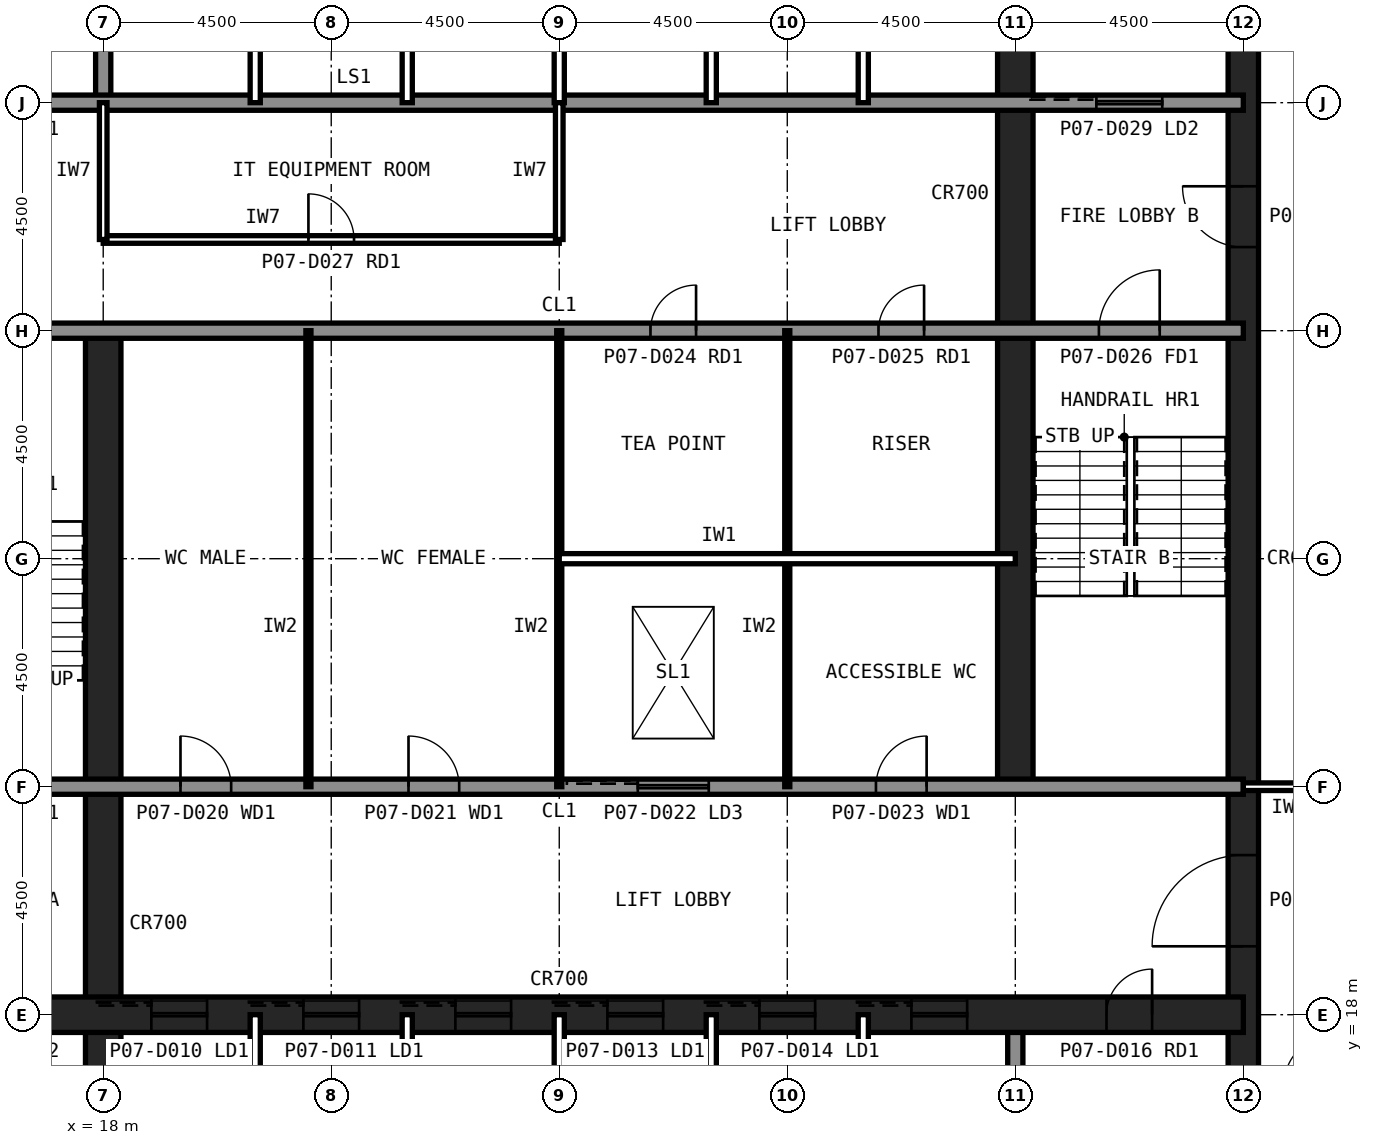
"""IFC4 building model, lengths in metres.
Left out: names, types, materials, properties, quantities, classifications, styles, units other than length and angle.
Written with IfcOpenShell. Run it as: python <this file> out.ifc"""

import sys

from ifc_helpers import new_model, si_unit, direction, frame, frame_2d, origin, place, context, subcontext, project, spatial, rectangle, extrude, element, fill, save


model = new_model("IFC4")
c1 = context("Model", 3, precision=1e-05, world=origin(), true_north=direction((0.0, 1.0)))
c2 = subcontext(c1, "Body", "Model", "MODEL_VIEW")
j1 = project(units=[si_unit("LENGTHUNIT", "METRE"), si_unit("PLANEANGLEUNIT", "RADIAN")], contexts=[c1])
p1 = place(None, origin())
s1 = spatial("IfcSite", under=j1, at=p1, CompositionType="ELEMENT")
p2 = place(p1, origin())
s2 = spatial("IfcBuilding", under=s1, at=p2, CompositionType="ELEMENT")
p3 = place(p2, frame((0.0, 0.0, 33.2)))
s3 = spatial("IfcBuildingStorey", under=s2, at=p3, CompositionType="ELEMENT", Elevation=33.2)
p4 = place(p3, frame((40.5, 13.5, 0.0), z_axis=(0.0, 0.0, 1.0), x_axis=(0.0, 1.0, 0.0)))
e1 = element("IfcWall", 1, at=p4, inside=s3, PredefinedType="SHEAR", context=c2, shape_type="SweptSolid", body=[
    extrude(rectangle(XDim=27.0, YDim=0.6, at=frame_2d((13.5, 0.0))), origin(), (0.0, 0.0, 1.0), 4.2),
])
p5 = place(p4, frame((5.85, 0.0, 0.0)))
e2 = element("IfcOpeningElement", 2, at=p5, cuts=e1, PredefinedType="OPENING", context=c2, shape_type="SweptSolid", body=[
    extrude(rectangle(XDim=1.8, YDim=2.1, at=frame_2d((0.9, 1.05))), frame((0.0, 0.31, 0.0), z_axis=(0.0, -1.0, 0.0), x_axis=(1.0, 0.0, 0.0)), (0.0, 0.0, 1.0), 0.62),
])
p6 = place(p4, frame((19.65, 0.0, 0.0)))
e3 = element("IfcOpeningElement", 3, at=p6, cuts=e1, PredefinedType="OPENING", context=c2, shape_type="SweptSolid", body=[
    extrude(rectangle(XDim=1.2, YDim=2.1, at=frame_2d((0.6, 1.05))), frame((0.0, 0.31, 0.0), z_axis=(0.0, -1.0, 0.0), x_axis=(1.0, 0.0, 0.0)), (0.0, 0.0, 1.0), 0.62),
])
p7 = place(p3, frame((18.0, 13.5, 0.0), z_axis=(0.0, 0.0, 1.0), x_axis=(0.0, 1.0, 0.0)))
e4 = element("IfcWall", 4, at=p7, inside=s3, PredefinedType="SHEAR", context=c2, shape_type="SweptSolid", body=[
    extrude(rectangle(XDim=18.0, YDim=0.7, at=frame_2d((9.0, 0.0))), origin(), (0.0, 0.0, 1.0), 4.2),
])
for number, where, z_axis, x_axis in (
    (5, (18.0, 36.0, 0.0), (0.0, 0.0, 1.0), (0.0, 1.0, 0.0)),
    (6, (36.0, 13.5, 0.0), (0.0, 0.0, 1.0), (0.0, 1.0, 0.0)),
):
    element("IfcWall", number, at=place(p3, frame(where, z_axis=z_axis, x_axis=x_axis)), inside=s3, PredefinedType="SOLIDWALL", context=c2, shape_type="SweptSolid", body=[
        extrude(rectangle(XDim=4.5, YDim=0.3, at=frame_2d((2.25, 0.0))), origin(), (0.0, 0.0, 1.0), 4.04),
    ])
p8 = place(p3, frame((36.0, 22.5, 0.0), z_axis=(0.0, 0.0, 1.0), x_axis=(0.0, 1.0, 0.0)))
e7 = element("IfcWall", 7, at=p8, inside=s3, PredefinedType="SHEAR", context=c2, shape_type="SweptSolid", body=[
    extrude(rectangle(XDim=18.0, YDim=0.7, at=frame_2d((9.0, 0.0))), origin(), (0.0, 0.0, 1.0), 4.2),
])
p9 = place(p3, frame((13.5, 18.0, 0.0), z_axis=(0.0, 0.0, 1.0), x_axis=(1.0, 0.0, 0.0)))
e8 = element("IfcWall", 8, at=p9, inside=s3, PredefinedType="SHEAR", context=c2, shape_type="SweptSolid", body=[
    extrude(rectangle(XDim=27.0, YDim=0.7, at=frame_2d((13.5, 0.0))), origin(), (0.0, 0.0, 1.0), 4.2),
])
p10 = place(p9, frame((24.3, 0.0, 0.0)))
e9 = element("IfcOpeningElement", 9, at=p10, cuts=e8, PredefinedType="OPENING", context=c2, shape_type="SweptSolid", body=[
    extrude(rectangle(XDim=0.9, YDim=2.1, at=frame_2d((0.45, 1.05))), frame((0.0, 0.36, 0.0), z_axis=(0.0, -1.0, 0.0), x_axis=(1.0, 0.0, 0.0)), (0.0, 0.0, 1.0), 0.72),
])
p11 = place(p9, frame((5.45, 0.0, 0.0)))
e10 = element("IfcOpeningElement", 10, at=p11, cuts=e8, PredefinedType="OPENING", context=c2, shape_type="SweptSolid", body=[
    extrude(rectangle(XDim=1.1, YDim=2.1, at=frame_2d((0.55, 1.05))), frame((0.0, 0.36, 0.0), z_axis=(0.0, -1.0, 0.0), x_axis=(1.0, 0.0, 0.0)), (0.0, 0.0, 1.0), 0.72),
])
p12 = place(p9, frame((8.45, 0.0, 0.0)))
e11 = element("IfcOpeningElement", 11, at=p12, cuts=e8, PredefinedType="OPENING", context=c2, shape_type="SweptSolid", body=[
    extrude(rectangle(XDim=1.1, YDim=2.1, at=frame_2d((0.55, 1.05))), frame((0.0, 0.36, 0.0), z_axis=(0.0, -1.0, 0.0), x_axis=(1.0, 0.0, 0.0)), (0.0, 0.0, 1.0), 0.72),
])
p13 = place(p9, frame((11.45, 0.0, 0.0)))
e12 = element("IfcOpeningElement", 12, at=p13, cuts=e8, PredefinedType="OPENING", context=c2, shape_type="SweptSolid", body=[
    extrude(rectangle(XDim=1.1, YDim=2.1, at=frame_2d((0.55, 1.05))), frame((0.0, 0.36, 0.0), z_axis=(0.0, -1.0, 0.0), x_axis=(1.0, 0.0, 0.0)), (0.0, 0.0, 1.0), 0.72),
])
p14 = place(p9, frame((14.45, 0.0, 0.0)))
e13 = element("IfcOpeningElement", 13, at=p14, cuts=e8, PredefinedType="OPENING", context=c2, shape_type="SweptSolid", body=[
    extrude(rectangle(XDim=1.1, YDim=2.1, at=frame_2d((0.55, 1.05))), frame((0.0, 0.36, 0.0), z_axis=(0.0, -1.0, 0.0), x_axis=(1.0, 0.0, 0.0)), (0.0, 0.0, 1.0), 0.72),
])
p15 = place(p9, frame((17.45, 0.0, 0.0)))
e14 = element("IfcOpeningElement", 14, at=p15, cuts=e8, PredefinedType="OPENING", context=c2, shape_type="SweptSolid", body=[
    extrude(rectangle(XDim=1.1, YDim=2.1, at=frame_2d((0.55, 1.05))), frame((0.0, 0.36, 0.0), z_axis=(0.0, -1.0, 0.0), x_axis=(1.0, 0.0, 0.0)), (0.0, 0.0, 1.0), 0.72),
])
p16 = place(p9, frame((20.45, 0.0, 0.0)))
e15 = element("IfcOpeningElement", 15, at=p16, cuts=e8, PredefinedType="OPENING", context=c2, shape_type="SweptSolid", body=[
    extrude(rectangle(XDim=1.1, YDim=2.1, at=frame_2d((0.55, 1.05))), frame((0.0, 0.36, 0.0), z_axis=(0.0, -1.0, 0.0), x_axis=(1.0, 0.0, 0.0)), (0.0, 0.0, 1.0), 0.72),
])
p17 = place(p9, frame((1.6, 0.0, 0.0)))
e16 = element("IfcOpeningElement", 16, at=p17, cuts=e8, PredefinedType="OPENING", context=c2, shape_type="SweptSolid", body=[
    extrude(rectangle(XDim=1.3, YDim=2.2, at=frame_2d((0.65, 1.1))), frame((0.0, 0.36, 0.0), z_axis=(0.0, -1.0, 0.0), x_axis=(1.0, 0.0, 0.0)), (0.0, 0.0, 1.0), 0.72),
])
p18 = place(p3, frame((13.5, 36.0, 0.0), z_axis=(0.0, 0.0, 1.0), x_axis=(1.0, 0.0, 0.0)))
e17 = element("IfcWall", 17, at=p18, inside=s3, PredefinedType="SOLIDWALL", context=c2, shape_type="SweptSolid", body=[
    extrude(rectangle(XDim=27.0, YDim=0.3, at=frame_2d((13.5, 0.0))), origin(), (0.0, 0.0, 1.0), 4.04),
])
p19 = place(p18, frame((1.8, 0.0, 0.0)))
e18 = element("IfcOpeningElement", 18, at=p19, cuts=e17, PredefinedType="OPENING", context=c2, shape_type="SweptSolid", body=[
    extrude(rectangle(XDim=0.9, YDim=2.1, at=frame_2d((0.45, 1.05))), frame((0.0, 0.16, 0.0), z_axis=(0.0, -1.0, 0.0), x_axis=(1.0, 0.0, 0.0)), (0.0, 0.0, 1.0), 0.32),
])
p20 = place(p18, frame((24.1, 0.0, 0.0)))
e19 = element("IfcOpeningElement", 19, at=p20, cuts=e17, PredefinedType="OPENING", context=c2, shape_type="SweptSolid", body=[
    extrude(rectangle(XDim=1.3, YDim=2.2, at=frame_2d((0.65, 1.1))), frame((0.0, 0.16, 0.0), z_axis=(0.0, -1.0, 0.0), x_axis=(1.0, 0.0, 0.0)), (0.0, 0.0, 1.0), 0.32),
])
p21 = place(p3, frame((13.5, 22.5, 0.0), z_axis=(0.0, 0.0, 1.0), x_axis=(1.0, 0.0, 0.0)))
e20 = element("IfcWall", 20, at=p21, inside=s3, PredefinedType="SOLIDWALL", context=c2, shape_type="SweptSolid", body=[
    extrude(rectangle(XDim=27.0, YDim=0.3, at=frame_2d((13.5, 0.0))), origin(), (0.0, 0.0, 1.0), 4.04),
])
p22 = place(p21, frame((1.65, 0.0, 0.0)))
e21 = element("IfcOpeningElement", 21, at=p22, cuts=e20, PredefinedType="OPENING", context=c2, shape_type="SweptSolid", body=[
    extrude(rectangle(XDim=1.2, YDim=2.1, at=frame_2d((0.6, 1.05))), frame((0.0, 0.16, 0.0), z_axis=(0.0, -1.0, 0.0), x_axis=(1.0, 0.0, 0.0)), (0.0, 0.0, 1.0), 0.32),
])
p23 = place(p21, frame((6.025, 0.0, 0.0)))
e22 = element("IfcOpeningElement", 22, at=p23, cuts=e20, PredefinedType="OPENING", context=c2, shape_type="SweptSolid", body=[
    extrude(rectangle(XDim=1.0, YDim=2.1, at=frame_2d((0.5, 1.05))), frame((0.0, 0.16, 0.0), z_axis=(0.0, -1.0, 0.0), x_axis=(1.0, 0.0, 0.0)), (0.0, 0.0, 1.0), 0.32),
])
p24 = place(p21, frame((10.525, 0.0, 0.0)))
e23 = element("IfcOpeningElement", 23, at=p24, cuts=e20, PredefinedType="OPENING", context=c2, shape_type="SweptSolid", body=[
    extrude(rectangle(XDim=1.0, YDim=2.1, at=frame_2d((0.5, 1.05))), frame((0.0, 0.16, 0.0), z_axis=(0.0, -1.0, 0.0), x_axis=(1.0, 0.0, 0.0)), (0.0, 0.0, 1.0), 0.32),
])
p25 = place(p21, frame((19.75, 0.0, 0.0)))
e24 = element("IfcOpeningElement", 24, at=p25, cuts=e20, PredefinedType="OPENING", context=c2, shape_type="SweptSolid", body=[
    extrude(rectangle(XDim=1.0, YDim=2.1, at=frame_2d((0.5, 1.05))), frame((0.0, 0.16, 0.0), z_axis=(0.0, -1.0, 0.0), x_axis=(1.0, 0.0, 0.0)), (0.0, 0.0, 1.0), 0.32),
])
p26 = place(p21, frame((15.05, 0.0, 0.0)))
e25 = element("IfcOpeningElement", 25, at=p26, cuts=e20, PredefinedType="OPENING", context=c2, shape_type="SweptSolid", body=[
    extrude(rectangle(XDim=1.4, YDim=2.4, at=frame_2d((0.7, 1.2))), frame((0.0, 0.16, 0.0), z_axis=(0.0, -1.0, 0.0), x_axis=(1.0, 0.0, 0.0)), (0.0, 0.0, 1.0), 0.32),
])
p27 = place(p3, frame((13.5, 31.5, 0.0), z_axis=(0.0, 0.0, 1.0), x_axis=(1.0, 0.0, 0.0)))
e26 = element("IfcWall", 26, at=p27, inside=s3, PredefinedType="SOLIDWALL", context=c2, shape_type="SweptSolid", body=[
    extrude(rectangle(XDim=27.0, YDim=0.3, at=frame_2d((13.5, 0.0))), origin(), (0.0, 0.0, 1.0), 4.04),
])
p28 = place(p27, frame((24.15, 0.0, 0.0)))
e27 = element("IfcOpeningElement", 27, at=p28, cuts=e26, PredefinedType="OPENING", context=c2, shape_type="SweptSolid", body=[
    extrude(rectangle(XDim=1.2, YDim=2.1, at=frame_2d((0.6, 1.05))), frame((0.0, 0.16, 0.0), z_axis=(0.0, -1.0, 0.0), x_axis=(1.0, 0.0, 0.0)), (0.0, 0.0, 1.0), 0.32),
])
p29 = place(p27, frame((15.3, 0.0, 0.0)))
e28 = element("IfcOpeningElement", 28, at=p29, cuts=e26, PredefinedType="OPENING", context=c2, shape_type="SweptSolid", body=[
    extrude(rectangle(XDim=0.9, YDim=2.1, at=frame_2d((0.45, 1.05))), frame((0.0, 0.16, 0.0), z_axis=(0.0, -1.0, 0.0), x_axis=(1.0, 0.0, 0.0)), (0.0, 0.0, 1.0), 0.32),
])
p30 = place(p27, frame((19.8, 0.0, 0.0)))
e29 = element("IfcOpeningElement", 29, at=p30, cuts=e26, PredefinedType="OPENING", context=c2, shape_type="SweptSolid", body=[
    extrude(rectangle(XDim=0.9, YDim=2.1, at=frame_2d((0.45, 1.05))), frame((0.0, 0.16, 0.0), z_axis=(0.0, -1.0, 0.0), x_axis=(1.0, 0.0, 0.0)), (0.0, 0.0, 1.0), 0.32),
])
for number, where, z_axis, x_axis in (
    (30, (21.0, 13.5, 0.0), (0.0, 0.0, 1.0), (0.0, 1.0, 0.0)),
    (31, (21.0, 36.0, 0.0), (0.0, 0.0, 1.0), (0.0, 1.0, 0.0)),
    (32, (24.0, 13.5, 0.0), (0.0, 0.0, 1.0), (0.0, 1.0, 0.0)),
    (33, (24.0, 36.0, 0.0), (0.0, 0.0, 1.0), (0.0, 1.0, 0.0)),
    (34, (27.0, 13.5, 0.0), (0.0, 0.0, 1.0), (0.0, 1.0, 0.0)),
    (35, (27.0, 36.0, 0.0), (0.0, 0.0, 1.0), (0.0, 1.0, 0.0)),
    (36, (30.0, 13.5, 0.0), (0.0, 0.0, 1.0), (0.0, 1.0, 0.0)),
    (37, (30.0, 36.0, 0.0), (0.0, 0.0, 1.0), (0.0, 1.0, 0.0)),
    (38, (33.0, 13.5, 0.0), (0.0, 0.0, 1.0), (0.0, 1.0, 0.0)),
    (39, (33.0, 36.0, 0.0), (0.0, 0.0, 1.0), (0.0, 1.0, 0.0)),
):
    element("IfcWall", number, at=place(p3, frame(where, z_axis=z_axis, x_axis=x_axis)), inside=s3, PredefinedType="PARTITIONING", context=c2, shape_type="SweptSolid", body=[
        extrude(rectangle(XDim=4.5, YDim=0.2, at=frame_2d((2.25, 0.0))), origin(), (0.0, 0.0, 1.0), 4.04),
    ])
for number, where, z_axis, x_axis in (
    (40, (22.05, 22.5, 0.0), (0.0, 0.0, 1.0), (0.0, 1.0, 0.0)),
    (41, (27.0, 22.5, 0.0), (0.0, 0.0, 1.0), (0.0, 1.0, 0.0)),
    (42, (31.5, 22.5, 0.0), (0.0, 0.0, 1.0), (0.0, 1.0, 0.0)),
):
    element("IfcWall", number, at=place(p3, frame(where, z_axis=z_axis, x_axis=x_axis)), inside=s3, PredefinedType="PLUMBINGWALL", context=c2, shape_type="SweptSolid", body=[
        extrude(rectangle(XDim=9.0, YDim=0.1, at=frame_2d((4.5, 0.0))), origin(), (0.0, 0.0, 1.0), 4.04),
    ])
p31 = place(p3, frame((27.0, 27.0, 0.0), z_axis=(0.0, 0.0, 1.0), x_axis=(1.0, 0.0, 0.0)))
e43 = element("IfcWall", 43, at=p31, inside=s3, PredefinedType="PARTITIONING", context=c2, shape_type="SweptSolid", body=[
    extrude(rectangle(XDim=9.0, YDim=0.2, at=frame_2d((4.5, 0.0))), origin(), (0.0, 0.0, 1.0), 4.04),
])
p32 = place(p3, frame((18.0, 33.3, 0.0), z_axis=(0.0, 0.0, 1.0), x_axis=(1.0, 0.0, 0.0)))
e44 = element("IfcWall", 44, at=p32, inside=s3, PredefinedType="PARTITIONING", context=c2, shape_type="SweptSolid", body=[
    extrude(rectangle(XDim=9.0, YDim=0.15, at=frame_2d((4.5, 0.0))), origin(), (0.0, 0.0, 1.0), 4.04),
])
p33 = place(p32, frame((4.05, 0.0, 0.0)))
e45 = element("IfcOpeningElement", 45, at=p33, cuts=e44, PredefinedType="OPENING", context=c2, shape_type="SweptSolid", body=[
    extrude(rectangle(XDim=0.9, YDim=2.1, at=frame_2d((0.45, 1.05))), frame((0.0, 0.085, 0.0), z_axis=(0.0, -1.0, 0.0), x_axis=(1.0, 0.0, 0.0)), (0.0, 0.0, 1.0), 0.17),
])
for number, where, z_axis, x_axis in (
    (46, (18.0, 33.3, 0.0), (0.0, 0.0, 1.0), (0.0, 1.0, 0.0)),
    (47, (27.0, 33.3, 0.0), (0.0, 0.0, 1.0), (0.0, 1.0, 0.0)),
):
    element("IfcWall", number, at=place(p3, frame(where, z_axis=z_axis, x_axis=x_axis)), inside=s3, PredefinedType="PARTITIONING", context=c2, shape_type="SweptSolid", body=[
        extrude(rectangle(XDim=2.7, YDim=0.15, at=frame_2d((1.35, 0.0))), origin(), (0.0, 0.0, 1.0), 4.04),
    ])
p34 = place(p3, frame((42.3, 22.5, 0.0), z_axis=(0.0, 0.0, 1.0), x_axis=(-1.0, 0.0, 0.0)))
e48 = element("IfcWall", 48, at=p34, inside=s3, PredefinedType="PARTITIONING", context=c2, shape_type="SweptSolid", body=[
    extrude(rectangle(XDim=1.8, YDim=0.15, at=frame_2d((0.9, 0.0))), origin(), (0.0, 0.0, 1.0), 3.189),
])
p35 = place(p5, origin())
e49 = element("IfcDoor", 49, at=p35, inside=s3, OperationType="SINGLE_SWING_LEFT", PredefinedType="DOOR", context=c2, shape_type="SweptSolid", body=[
    extrude(rectangle(XDim=1.8, YDim=2.1, at=frame_2d((0.9, 1.05))), frame((0.0, 0.025, 0.0), z_axis=(0.0, -1.0, 0.0), x_axis=(1.0, 0.0, 0.0)), (0.0, 0.0, 1.0), 0.05),
])
fill(e2, e49)
p36 = place(p6, origin())
e50 = element("IfcDoor", 50, at=p36, inside=s3, OperationType="SINGLE_SWING_RIGHT", PredefinedType="DOOR", context=c2, shape_type="SweptSolid", body=[
    extrude(rectangle(XDim=1.2, YDim=2.1, at=frame_2d((0.6, 1.05))), frame((0.0, 0.025, 0.0), z_axis=(0.0, -1.0, 0.0), x_axis=(1.0, 0.0, 0.0)), (0.0, 0.0, 1.0), 0.05),
])
fill(e3, e50)
p37 = place(p28, origin())
e51 = element("IfcDoor", 51, at=p37, inside=s3, OperationType="SINGLE_SWING_RIGHT", PredefinedType="DOOR", context=c2, shape_type="SweptSolid", body=[
    extrude(rectangle(XDim=1.2, YDim=2.1, at=frame_2d((0.6, 1.05))), frame((0.0, 0.025, 0.0), z_axis=(0.0, -1.0, 0.0), x_axis=(1.0, 0.0, 0.0)), (0.0, 0.0, 1.0), 0.05),
])
fill(e27, e51)
p38 = place(p23, origin())
e52 = element("IfcDoor", 52, at=p38, inside=s3, OperationType="SINGLE_SWING_LEFT", PredefinedType="DOOR", context=c2, shape_type="SweptSolid", body=[
    extrude(rectangle(XDim=1.0, YDim=2.1, at=frame_2d((0.5, 1.05))), frame((0.0, 0.025, 0.0), z_axis=(0.0, -1.0, 0.0), x_axis=(1.0, 0.0, 0.0)), (0.0, 0.0, 1.0), 0.05),
])
fill(e22, e52)
p39 = place(p24, origin())
e53 = element("IfcDoor", 53, at=p39, inside=s3, OperationType="SINGLE_SWING_LEFT", PredefinedType="DOOR", context=c2, shape_type="SweptSolid", body=[
    extrude(rectangle(XDim=1.0, YDim=2.1, at=frame_2d((0.5, 1.05))), frame((0.0, 0.025, 0.0), z_axis=(0.0, -1.0, 0.0), x_axis=(1.0, 0.0, 0.0)), (0.0, 0.0, 1.0), 0.05),
])
fill(e23, e53)
p40 = place(p25, origin())
e54 = element("IfcDoor", 54, at=p40, inside=s3, OperationType="SINGLE_SWING_RIGHT", PredefinedType="DOOR", context=c2, shape_type="SweptSolid", body=[
    extrude(rectangle(XDim=1.0, YDim=2.1, at=frame_2d((0.5, 1.05))), frame((0.0, 0.025, 0.0), z_axis=(0.0, -1.0, 0.0), x_axis=(1.0, 0.0, 0.0)), (0.0, 0.0, 1.0), 0.05),
])
fill(e24, e54)
p41 = place(p29, origin())
e55 = element("IfcDoor", 55, at=p41, inside=s3, OperationType="SINGLE_SWING_RIGHT", PredefinedType="DOOR", context=c2, shape_type="SweptSolid", body=[
    extrude(rectangle(XDim=0.9, YDim=2.1, at=frame_2d((0.45, 1.05))), frame((0.0, 0.025, 0.0), z_axis=(0.0, -1.0, 0.0), x_axis=(1.0, 0.0, 0.0)), (0.0, 0.0, 1.0), 0.05),
])
fill(e28, e55)
p42 = place(p30, origin())
e56 = element("IfcDoor", 56, at=p42, inside=s3, OperationType="SINGLE_SWING_RIGHT", PredefinedType="DOOR", context=c2, shape_type="SweptSolid", body=[
    extrude(rectangle(XDim=0.9, YDim=2.1, at=frame_2d((0.45, 1.05))), frame((0.0, 0.025, 0.0), z_axis=(0.0, -1.0, 0.0), x_axis=(1.0, 0.0, 0.0)), (0.0, 0.0, 1.0), 0.05),
])
fill(e29, e56)
p43 = place(p10, origin())
e57 = element("IfcDoor", 57, at=p43, inside=s3, OperationType="SINGLE_SWING_RIGHT", PredefinedType="DOOR", context=c2, shape_type="SweptSolid", body=[
    extrude(rectangle(XDim=0.9, YDim=2.1, at=frame_2d((0.45, 1.05))), frame((0.0, 0.025, 0.0), z_axis=(0.0, -1.0, 0.0), x_axis=(1.0, 0.0, 0.0)), (0.0, 0.0, 1.0), 0.05),
])
fill(e9, e57)
p44 = place(p33, origin())
e58 = element("IfcDoor", 58, at=p44, inside=s3, OperationType="SINGLE_SWING_LEFT", PredefinedType="DOOR", context=c2, shape_type="SweptSolid", body=[
    extrude(rectangle(XDim=0.9, YDim=2.1, at=frame_2d((0.45, 1.05))), frame((0.0, 0.025, 0.0), z_axis=(0.0, -1.0, 0.0), x_axis=(1.0, 0.0, 0.0)), (0.0, 0.0, 1.0), 0.05),
])
fill(e45, e58)
p45 = place(p11, origin())
e59 = element("IfcDoor", 59, at=p45, inside=s3, OperationType="SLIDING_TO_LEFT", PredefinedType="DOOR", context=c2, shape_type="SweptSolid", body=[
    extrude(rectangle(XDim=1.1, YDim=2.1, at=frame_2d((0.55, 1.05))), frame((0.0, 0.025, 0.0), z_axis=(0.0, -1.0, 0.0), x_axis=(1.0, 0.0, 0.0)), (0.0, 0.0, 1.0), 0.05),
])
fill(e10, e59)
p46 = place(p12, origin())
e60 = element("IfcDoor", 60, at=p46, inside=s3, OperationType="SLIDING_TO_LEFT", PredefinedType="DOOR", context=c2, shape_type="SweptSolid", body=[
    extrude(rectangle(XDim=1.1, YDim=2.1, at=frame_2d((0.55, 1.05))), frame((0.0, 0.025, 0.0), z_axis=(0.0, -1.0, 0.0), x_axis=(1.0, 0.0, 0.0)), (0.0, 0.0, 1.0), 0.05),
])
fill(e11, e60)
p47 = place(p13, origin())
e61 = element("IfcDoor", 61, at=p47, inside=s3, OperationType="SLIDING_TO_LEFT", PredefinedType="DOOR", context=c2, shape_type="SweptSolid", body=[
    extrude(rectangle(XDim=1.1, YDim=2.1, at=frame_2d((0.55, 1.05))), frame((0.0, 0.025, 0.0), z_axis=(0.0, -1.0, 0.0), x_axis=(1.0, 0.0, 0.0)), (0.0, 0.0, 1.0), 0.05),
])
fill(e12, e61)
p48 = place(p14, origin())
e62 = element("IfcDoor", 62, at=p48, inside=s3, OperationType="SLIDING_TO_LEFT", PredefinedType="DOOR", context=c2, shape_type="SweptSolid", body=[
    extrude(rectangle(XDim=1.1, YDim=2.1, at=frame_2d((0.55, 1.05))), frame((0.0, 0.025, 0.0), z_axis=(0.0, -1.0, 0.0), x_axis=(1.0, 0.0, 0.0)), (0.0, 0.0, 1.0), 0.05),
])
fill(e13, e62)
p49 = place(p15, origin())
e63 = element("IfcDoor", 63, at=p49, inside=s3, OperationType="SLIDING_TO_LEFT", PredefinedType="DOOR", context=c2, shape_type="SweptSolid", body=[
    extrude(rectangle(XDim=1.1, YDim=2.1, at=frame_2d((0.55, 1.05))), frame((0.0, 0.025, 0.0), z_axis=(0.0, -1.0, 0.0), x_axis=(1.0, 0.0, 0.0)), (0.0, 0.0, 1.0), 0.05),
])
fill(e14, e63)
p50 = place(p16, origin())
e64 = element("IfcDoor", 64, at=p50, inside=s3, OperationType="SLIDING_TO_LEFT", PredefinedType="DOOR", context=c2, shape_type="SweptSolid", body=[
    extrude(rectangle(XDim=1.1, YDim=2.1, at=frame_2d((0.55, 1.05))), frame((0.0, 0.025, 0.0), z_axis=(0.0, -1.0, 0.0), x_axis=(1.0, 0.0, 0.0)), (0.0, 0.0, 1.0), 0.05),
])
fill(e15, e64)
p51 = place(p20, origin())
e65 = element("IfcDoor", 65, at=p51, inside=s3, OperationType="SLIDING_TO_LEFT", PredefinedType="DOOR", context=c2, shape_type="SweptSolid", body=[
    extrude(rectangle(XDim=1.3, YDim=2.2, at=frame_2d((0.65, 1.1))), frame((0.0, 0.025, 0.0), z_axis=(0.0, -1.0, 0.0), x_axis=(1.0, 0.0, 0.0)), (0.0, 0.0, 1.0), 0.05),
])
fill(e19, e65)
p52 = place(p26, origin())
e66 = element("IfcDoor", 66, at=p52, inside=s3, OperationType="SLIDING_TO_LEFT", PredefinedType="DOOR", context=c2, shape_type="SweptSolid", body=[
    extrude(rectangle(XDim=1.4, YDim=2.4, at=frame_2d((0.7, 1.2))), frame((0.0, 0.025, 0.0), z_axis=(0.0, -1.0, 0.0), x_axis=(1.0, 0.0, 0.0)), (0.0, 0.0, 1.0), 0.05),
])
fill(e25, e66)
save(model, sys.argv[1])
